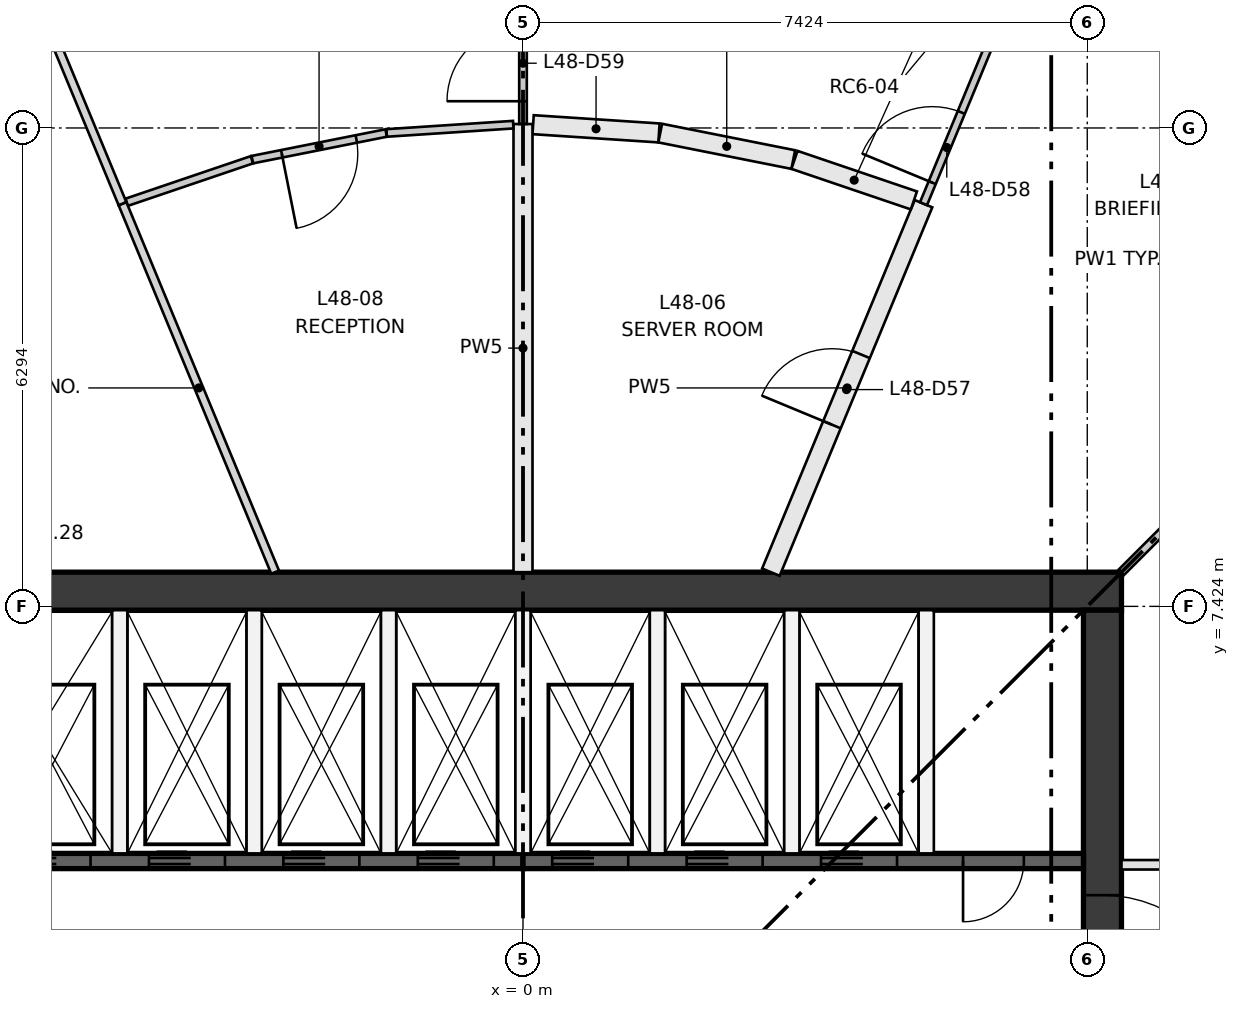
"""IFC4 building model, lengths in metres.
Left out: names, types, materials, properties, quantities, classifications, styles, units other than length and angle.
Written with IfcOpenShell. Run it as: python <this file> out.ifc"""

import sys

from ifc_helpers import new_model, si_unit, direction, frame, frame_2d, origin, place, context, subcontext, project, spatial, rectangle, extrude, element, fill, save


model = new_model("IFC4")
c1 = context("Model", 3, precision=1e-05, world=origin(), true_north=direction((0.0, 1.0)))
c2 = subcontext(c1, "Body", "Model", "MODEL_VIEW")
j1 = project(units=[si_unit("LENGTHUNIT", "METRE"), si_unit("PLANEANGLEUNIT", "RADIAN")], contexts=[c1])
p1 = place(None, origin())
s1 = spatial("IfcSite", under=j1, at=p1, CompositionType="ELEMENT")
p2 = place(p1, origin())
s2 = spatial("IfcBuilding", under=s1, at=p2, CompositionType="ELEMENT")
p3 = place(p2, frame((0.0, 0.0, 180.95)))
s3 = spatial("IfcBuildingStorey", under=s2, at=p3, CompositionType="ELEMENT", Elevation=180.95)
p4 = place(p3, frame((-7.874, 7.624, 0.0), z_axis=(0.0, 0.0, 1.0), x_axis=(1.0, 0.0, 0.0)))
e1 = element("IfcWall", 1, at=p4, inside=s3, PredefinedType="SHEAR", context=c2, shape_type="SweptSolid", body=[
    extrude(rectangle(XDim=15.748, YDim=0.5, at=frame_2d((7.874, 0.0))), origin(), (0.0, 0.0, 1.0), 3.35),
])
p5 = place(p3, frame((7.624, -7.374, 0.0), z_axis=(0.0, 0.0, 1.0), x_axis=(0.0, 1.0, 0.0)))
e2 = element("IfcWall", 2, at=p5, inside=s3, PredefinedType="SHEAR", context=c2, shape_type="SweptSolid", body=[
    extrude(rectangle(XDim=14.748, YDim=0.5, at=frame_2d((7.374, 0.0))), origin(), (0.0, 0.0, 1.0), 3.35),
])
p6 = place(p5, frame((6.874, 0.0, 0.0)))
e3 = element("IfcOpeningElement", 3, at=p6, cuts=e2, PredefinedType="OPENING", context=c2, shape_type="SweptSolid", body=[
    extrude(rectangle(XDim=1.0, YDim=2.1, at=frame_2d((0.5, 1.05))), frame((0.0, 0.26, 0.0), z_axis=(0.0, -1.0, 0.0), x_axis=(1.0, 0.0, 0.0)), (0.0, 0.0, 1.0), 0.52),
])
p7 = place(p5, frame((3.75, 0.0, 0.0)))
e4 = element("IfcOpeningElement", 4, at=p7, cuts=e2, PredefinedType="OPENING", context=c2, shape_type="SweptSolid", body=[
    extrude(rectangle(XDim=1.8, YDim=2.1, at=frame_2d((0.9, 1.05))), frame((0.0, 0.26, 0.0), z_axis=(0.0, -1.0, 0.0), x_axis=(1.0, 0.0, 0.0)), (0.0, 0.0, 1.0), 0.52),
])
p8 = place(p5, frame((9.198, 0.0, 0.0)))
e5 = element("IfcOpeningElement", 5, at=p8, cuts=e2, PredefinedType="OPENING", context=c2, shape_type="SweptSolid", body=[
    extrude(rectangle(XDim=1.8, YDim=2.1, at=frame_2d((0.9, 1.05))), frame((0.0, 0.26, 0.0), z_axis=(0.0, -1.0, 0.0), x_axis=(1.0, 0.0, 0.0)), (0.0, 0.0, 1.0), 0.52),
])
p9 = place(p3, frame((-7.374, 4.074, 0.0), z_axis=(0.0, 0.0, 1.0), x_axis=(1.0, 0.0, 0.0)))
e6 = element("IfcWall", 6, at=p9, inside=s3, PredefinedType="SHEAR", context=c2, shape_type="SweptSolid", body=[
    extrude(rectangle(XDim=7.374, YDim=0.2, at=frame_2d((3.687, 0.0))), origin(), (0.0, 0.0, 1.0), 3.0),
])
p10 = place(p9, frame((0.684, 0.0, 0.0)))
e7 = element("IfcOpeningElement", 7, at=p10, cuts=e6, PredefinedType="OPENING", context=c2, shape_type="SweptSolid", body=[
    extrude(rectangle(XDim=1.0, YDim=2.1, at=frame_2d((0.5, 1.05))), frame((0.0, 0.11, 0.0), z_axis=(0.0, -1.0, 0.0), x_axis=(1.0, 0.0, 0.0)), (0.0, 0.0, 1.0), 0.22),
])
p11 = place(p9, frame((2.453, 0.0, 0.0)))
e8 = element("IfcOpeningElement", 8, at=p11, cuts=e6, PredefinedType="OPENING", context=c2, shape_type="SweptSolid", body=[
    extrude(rectangle(XDim=1.0, YDim=2.1, at=frame_2d((0.5, 1.05))), frame((0.0, 0.11, 0.0), z_axis=(0.0, -1.0, 0.0), x_axis=(1.0, 0.0, 0.0)), (0.0, 0.0, 1.0), 0.22),
])
p12 = place(p9, frame((4.221, 0.0, 0.0)))
e9 = element("IfcOpeningElement", 9, at=p12, cuts=e6, PredefinedType="OPENING", context=c2, shape_type="SweptSolid", body=[
    extrude(rectangle(XDim=1.0, YDim=2.1, at=frame_2d((0.5, 1.05))), frame((0.0, 0.11, 0.0), z_axis=(0.0, -1.0, 0.0), x_axis=(1.0, 0.0, 0.0)), (0.0, 0.0, 1.0), 0.22),
])
p13 = place(p9, frame((5.99, 0.0, 0.0)))
e10 = element("IfcOpeningElement", 10, at=p13, cuts=e6, PredefinedType="OPENING", context=c2, shape_type="SweptSolid", body=[
    extrude(rectangle(XDim=1.0, YDim=2.1, at=frame_2d((0.5, 1.05))), frame((0.0, 0.11, 0.0), z_axis=(0.0, -1.0, 0.0), x_axis=(1.0, 0.0, 0.0)), (0.0, 0.0, 1.0), 0.22),
])
p14 = place(p3, frame((0.0, 4.074, 0.0), z_axis=(0.0, 0.0, 1.0), x_axis=(1.0, 0.0, 0.0)))
e11 = element("IfcWall", 11, at=p14, inside=s3, PredefinedType="SHEAR", context=c2, shape_type="SweptSolid", body=[
    extrude(rectangle(XDim=7.374, YDim=0.2, at=frame_2d((3.687, 0.0))), origin(), (0.0, 0.0, 1.0), 3.0),
])
p15 = place(p14, frame((0.384, 0.0, 0.0)))
e12 = element("IfcOpeningElement", 12, at=p15, cuts=e11, PredefinedType="OPENING", context=c2, shape_type="SweptSolid", body=[
    extrude(rectangle(XDim=1.0, YDim=2.1, at=frame_2d((0.5, 1.05))), frame((0.0, 0.11, 0.0), z_axis=(0.0, -1.0, 0.0), x_axis=(1.0, 0.0, 0.0)), (0.0, 0.0, 1.0), 0.22),
])
p16 = place(p14, frame((2.153, 0.0, 0.0)))
e13 = element("IfcOpeningElement", 13, at=p16, cuts=e11, PredefinedType="OPENING", context=c2, shape_type="SweptSolid", body=[
    extrude(rectangle(XDim=1.0, YDim=2.1, at=frame_2d((0.5, 1.05))), frame((0.0, 0.11, 0.0), z_axis=(0.0, -1.0, 0.0), x_axis=(1.0, 0.0, 0.0)), (0.0, 0.0, 1.0), 0.22),
])
p17 = place(p14, frame((3.921, 0.0, 0.0)))
e14 = element("IfcOpeningElement", 14, at=p17, cuts=e11, PredefinedType="OPENING", context=c2, shape_type="SweptSolid", body=[
    extrude(rectangle(XDim=1.0, YDim=2.1, at=frame_2d((0.5, 1.05))), frame((0.0, 0.11, 0.0), z_axis=(0.0, -1.0, 0.0), x_axis=(1.0, 0.0, 0.0)), (0.0, 0.0, 1.0), 0.22),
])
p18 = place(p14, frame((5.79, 0.0, 0.0)))
e15 = element("IfcOpeningElement", 15, at=p18, cuts=e11, PredefinedType="OPENING", context=c2, shape_type="SweptSolid", body=[
    extrude(rectangle(XDim=0.8, YDim=2.1, at=frame_2d((0.4, 1.05))), frame((0.0, 0.11, 0.0), z_axis=(0.0, -1.0, 0.0), x_axis=(1.0, 0.0, 0.0)), (0.0, 0.0, 1.0), 0.22),
])
for number, where, z_axis, x_axis in (
    (16, (-5.305, 4.174, 0.0), (0.0, 0.0, 1.0), (0.0, 1.0, 0.0)),
    (17, (-3.537, 4.174, 0.0), (0.0, 0.0, 1.0), (0.0, 1.0, 0.0)),
    (18, (-1.769, 4.174, 0.0), (0.0, 0.0, 1.0), (0.0, 1.0, 0.0)),
    (19, (0.0, 4.174, 0.0), (0.0, 0.0, 1.0), (0.0, 1.0, 0.0)),
    (20, (1.769, 4.174, 0.0), (0.0, 0.0, 1.0), (0.0, 1.0, 0.0)),
    (21, (3.537, 4.174, 0.0), (0.0, 0.0, 1.0), (0.0, 1.0, 0.0)),
    (22, (5.305, 4.174, 0.0), (0.0, 0.0, 1.0), (0.0, 1.0, 0.0)),
):
    element("IfcWall", number, at=place(p3, frame(where, z_axis=z_axis, x_axis=x_axis)), inside=s3, PredefinedType="PARTITIONING", context=c2, shape_type="SweptSolid", body=[
        extrude(rectangle(XDim=3.2, YDim=0.2, at=frame_2d((1.6, 0.0))), origin(), (0.0, 0.0, 1.0), 3.0),
    ])
p19 = place(p3, frame((7.874, 4.024, 0.0), z_axis=(0.0, 0.0, 1.0), x_axis=(1.0, 0.0, 0.0)))
e23 = element("IfcWall", 23, at=p19, inside=s3, PredefinedType="PARTITIONING", context=c2, shape_type="SweptSolid", body=[
    extrude(rectangle(XDim=5.921, YDim=0.125, at=frame_2d((2.96, 0.0))), origin(), (0.0, 0.0, 1.0), 3.0),
])
p20 = place(p19, frame((2.5, 0.0, 0.0)))
e24 = element("IfcOpeningElement", 24, at=p20, cuts=e23, PredefinedType="OPENING", context=c2, shape_type="SweptSolid", body=[
    extrude(rectangle(XDim=1.0, YDim=2.1, at=frame_2d((0.5, 1.05))), frame((0.0, 0.073, 0.0), z_axis=(0.0, -1.0, 0.0), x_axis=(1.0, 0.0, 0.0)), (0.0, 0.0, 1.0), 0.145),
])
p21 = place(p3, frame((7.874, 7.874, 0.0), z_axis=(0.0, 0.0, 1.0), x_axis=(0.707106781187, 0.707106781187, 0.0)))
e25 = element("IfcWall", 25, at=p21, inside=s3, PredefinedType="PARTITIONING", context=c2, shape_type="SweptSolid", body=[
    extrude(rectangle(XDim=6.404, YDim=0.1, at=frame_2d((3.202, 0.0))), origin(), (0.0, 0.0, 1.0), 3.0),
])
p22 = place(p21, frame((2.4, 0.0, 0.0)))
e26 = element("IfcOpeningElement", 26, at=p22, cuts=e25, PredefinedType="OPENING", context=c2, shape_type="SweptSolid", body=[
    extrude(rectangle(XDim=1.0, YDim=2.1, at=frame_2d((0.5, 1.05))), frame((0.0, 0.06, 0.0), z_axis=(0.0, -1.0, 0.0), x_axis=(1.0, 0.0, 0.0)), (0.0, 0.0, 1.0), 0.12),
])
p23 = place(p3, frame((3.261, 7.874, 0.0), z_axis=(0.0, 0.0, 1.0), x_axis=(0.382698345407, 0.923873355186, 0.0)))
e27 = element("IfcWall", 27, at=p23, inside=s3, PredefinedType="PARTITIONING", context=c2, shape_type="SweptSolid", body=[
    extrude(rectangle(XDim=5.247, YDim=0.25, at=frame_2d((2.624, 0.0))), origin(), (0.0, 0.0, 1.0), 3.0),
])
p24 = place(p23, frame((2.1, 0.0, 0.0)))
e28 = element("IfcOpeningElement", 28, at=p24, cuts=e27, PredefinedType="OPENING", context=c2, shape_type="SweptSolid", body=[
    extrude(rectangle(XDim=1.0, YDim=2.1, at=frame_2d((0.5, 1.05))), frame((0.0, 0.135, 0.0), z_axis=(0.0, -1.0, 0.0), x_axis=(1.0, 0.0, 0.0)), (0.0, 0.0, 1.0), 0.27),
])
p25 = place(p3, frame((5.27, 12.722, 0.0), z_axis=(0.0, 0.0, 1.0), x_axis=(0.382706376162, 0.923870028546, 0.0)))
e29 = element("IfcWall", 29, at=p25, inside=s3, PredefinedType="PARTITIONING", context=c2, shape_type="SweptSolid", body=[
    extrude(rectangle(XDim=3.77, YDim=0.1, at=frame_2d((1.885, 0.0))), origin(), (0.0, 0.0, 1.0), 3.0),
])
p26 = place(p25, frame((0.3, 0.0, 0.0)))
e30 = element("IfcOpeningElement", 30, at=p26, cuts=e29, PredefinedType="OPENING", context=c2, shape_type="SweptSolid", body=[
    extrude(rectangle(XDim=1.0, YDim=2.1, at=frame_2d((0.5, 1.05))), frame((0.0, 0.06, 0.0), z_axis=(0.0, -1.0, 0.0), x_axis=(1.0, 0.0, 0.0)), (0.0, 0.0, 1.0), 0.12),
])
p27 = place(p3, frame((0.133, 13.761, 0.0), z_axis=(0.0, 0.0, 1.0), x_axis=(0.997854270927, -0.065474071153, 0.0)))
e31 = element("IfcWall", 31, at=p27, inside=s3, PredefinedType="PARTITIONING", context=c2, shape_type="SweptSolid", body=[
    extrude(rectangle(XDim=1.659, YDim=0.25, at=frame_2d((0.83, 0.0))), origin(), (0.0, 0.0, 1.0), 3.0),
])
p28 = place(p3, frame((1.805, 13.651, 0.0), z_axis=(0.0, 0.0, 1.0), x_axis=(0.980790558622, -0.195063784741, 0.0)))
e32 = element("IfcWall", 32, at=p28, inside=s3, PredefinedType="PARTITIONING", context=c2, shape_type="SweptSolid", body=[
    extrude(rectangle(XDim=1.785, YDim=0.25, at=frame_2d((0.892, 0.0))), origin(), (0.0, 0.0, 1.0), 3.0),
])
p29 = place(p3, frame((3.572, 13.298, 0.0), z_axis=(0.0, 0.0, 1.0), x_axis=(0.946917930367, -0.321475400536, 0.0)))
e33 = element("IfcWall", 33, at=p29, inside=s3, PredefinedType="PARTITIONING", context=c2, shape_type="SweptSolid", body=[
    extrude(rectangle(XDim=1.659, YDim=0.25, at=frame_2d((0.83, 0.0))), origin(), (0.0, 0.0, 1.0), 3.0),
])
p30 = place(p3, frame((0.0, 7.874, 0.0), z_axis=(0.0, 0.0, 1.0), x_axis=(0.0, 1.0, 0.0)))
e34 = element("IfcWall", 34, at=p30, inside=s3, PredefinedType="PARTITIONING", context=c2, shape_type="SweptSolid", body=[
    extrude(rectangle(XDim=5.896, YDim=0.25, at=frame_2d((2.948, 0.0))), origin(), (0.0, 0.0, 1.0), 3.0),
])
p31 = place(p3, frame((0.0, 13.77, 0.0), z_axis=(0.0, 0.0, 1.0), x_axis=(0.0, 1.0, 0.0)))
e35 = element("IfcWall", 35, at=p31, inside=s3, PredefinedType="PARTITIONING", context=c2, shape_type="SweptSolid", body=[
    extrude(rectangle(XDim=3.77, YDim=0.1, at=frame_2d((1.885, 0.0))), origin(), (0.0, 0.0, 1.0), 3.0),
])
p32 = place(p31, frame((0.3, 0.0, 0.0)))
e36 = element("IfcOpeningElement", 36, at=p32, cuts=e35, PredefinedType="OPENING", context=c2, shape_type="SweptSolid", body=[
    extrude(rectangle(XDim=1.0, YDim=2.1, at=frame_2d((0.5, 1.05))), frame((0.0, 0.06, 0.0), z_axis=(0.0, -1.0, 0.0), x_axis=(1.0, 0.0, 0.0)), (0.0, 0.0, 1.0), 0.12),
])
p33 = place(p3, frame((-5.214, 12.74, 0.0), z_axis=(0.0, 0.0, 1.0), x_axis=(0.946900132427, 0.321527820274, 0.0)))
e37 = element("IfcWall", 37, at=p33, inside=s3, PredefinedType="PARTITIONING", context=c2, shape_type="SweptSolid", body=[
    extrude(rectangle(XDim=1.74, YDim=0.1, at=frame_2d((0.87, 0.0))), origin(), (0.0, 0.0, 1.0), 3.0),
])
p34 = place(p3, frame((-1.801, 13.652, 0.0), z_axis=(0.0, 0.0, 1.0), x_axis=(-0.980789397091, -0.195069624886, 0.0)))
e38 = element("IfcWall", 38, at=p34, inside=s3, PredefinedType="PARTITIONING", context=c2, shape_type="SweptSolid", body=[
    extrude(rectangle(XDim=1.795, YDim=0.1, at=frame_2d((0.897, 0.0))), origin(), (0.0, 0.0, 1.0), 3.0),
])
p35 = place(p34, frame((0.4, 0.0, 0.0)))
e39 = element("IfcOpeningElement", 39, at=p35, cuts=e38, PredefinedType="OPENING", context=c2, shape_type="SweptSolid", body=[
    extrude(rectangle(XDim=1.0, YDim=2.1, at=frame_2d((0.5, 1.05))), frame((0.0, 0.06, 0.0), z_axis=(0.0, -1.0, 0.0), x_axis=(1.0, 0.0, 0.0)), (0.0, 0.0, 1.0), 0.12),
])
p36 = place(p3, frame((-1.794, 13.652, 0.0), z_axis=(0.0, 0.0, 1.0), x_axis=(0.997850681937, 0.065528746043, 0.0)))
e40 = element("IfcWall", 40, at=p36, inside=s3, PredefinedType="PARTITIONING", context=c2, shape_type="SweptSolid", body=[
    extrude(rectangle(XDim=1.669, YDim=0.1, at=frame_2d((0.834, 0.0))), origin(), (0.0, 0.0, 1.0), 3.0),
])
p37 = place(p3, frame((-3.261, 7.874, 0.0), z_axis=(0.0, 0.0, 1.0), x_axis=(-0.382698345407, 0.923873355186, 0.0)))
e41 = element("IfcWall", 41, at=p37, inside=s3, PredefinedType="PARTITIONING", context=c2, shape_type="SweptSolid", body=[
    extrude(rectangle(XDim=5.247, YDim=0.11, at=frame_2d((2.624, 0.0))), origin(), (0.0, 0.0, 1.0), 3.0),
])
p38 = place(p3, frame((-5.27, 12.722, 0.0), z_axis=(0.0, 0.0, 1.0), x_axis=(-0.382706376162, 0.923870028546, 0.0)))
e42 = element("IfcWall", 42, at=p38, inside=s3, PredefinedType="PARTITIONING", context=c2, shape_type="SweptSolid", body=[
    extrude(rectangle(XDim=3.77, YDim=0.11, at=frame_2d((1.885, 0.0))), origin(), (0.0, 0.0, 1.0), 3.0),
])
p39 = place(p10, frame((1.0, 0.0, 0.0), z_axis=(0.0, 0.0, 1.0), x_axis=(-1.0, 0.0, 0.0)))
e43 = element("IfcDoor", 43, at=p39, inside=s3, OperationType="DOUBLE_DOOR_SLIDING", PredefinedType="DOOR", context=c2, shape_type="SweptSolid", body=[
    extrude(rectangle(XDim=1.0, YDim=2.1, at=frame_2d((0.5, 1.05))), frame((0.0, 0.025, 0.0), z_axis=(0.0, -1.0, 0.0), x_axis=(1.0, 0.0, 0.0)), (0.0, 0.0, 1.0), 0.05),
])
fill(e7, e43)
p40 = place(p11, frame((1.0, 0.0, 0.0), z_axis=(0.0, 0.0, 1.0), x_axis=(-1.0, 0.0, 0.0)))
e44 = element("IfcDoor", 44, at=p40, inside=s3, OperationType="DOUBLE_DOOR_SLIDING", PredefinedType="DOOR", context=c2, shape_type="SweptSolid", body=[
    extrude(rectangle(XDim=1.0, YDim=2.1, at=frame_2d((0.5, 1.05))), frame((0.0, 0.025, 0.0), z_axis=(0.0, -1.0, 0.0), x_axis=(1.0, 0.0, 0.0)), (0.0, 0.0, 1.0), 0.05),
])
fill(e8, e44)
p41 = place(p12, frame((1.0, 0.0, 0.0), z_axis=(0.0, 0.0, 1.0), x_axis=(-1.0, 0.0, 0.0)))
e45 = element("IfcDoor", 45, at=p41, inside=s3, OperationType="DOUBLE_DOOR_SLIDING", PredefinedType="DOOR", context=c2, shape_type="SweptSolid", body=[
    extrude(rectangle(XDim=1.0, YDim=2.1, at=frame_2d((0.5, 1.05))), frame((0.0, 0.025, 0.0), z_axis=(0.0, -1.0, 0.0), x_axis=(1.0, 0.0, 0.0)), (0.0, 0.0, 1.0), 0.05),
])
fill(e9, e45)
p42 = place(p13, frame((1.0, 0.0, 0.0), z_axis=(0.0, 0.0, 1.0), x_axis=(-1.0, 0.0, 0.0)))
e46 = element("IfcDoor", 46, at=p42, inside=s3, OperationType="DOUBLE_DOOR_SLIDING", PredefinedType="DOOR", context=c2, shape_type="SweptSolid", body=[
    extrude(rectangle(XDim=1.0, YDim=2.1, at=frame_2d((0.5, 1.05))), frame((0.0, 0.025, 0.0), z_axis=(0.0, -1.0, 0.0), x_axis=(1.0, 0.0, 0.0)), (0.0, 0.0, 1.0), 0.05),
])
fill(e10, e46)
p43 = place(p15, frame((1.0, 0.0, 0.0), z_axis=(0.0, 0.0, 1.0), x_axis=(-1.0, 0.0, 0.0)))
e47 = element("IfcDoor", 47, at=p43, inside=s3, OperationType="DOUBLE_DOOR_SLIDING", PredefinedType="DOOR", context=c2, shape_type="SweptSolid", body=[
    extrude(rectangle(XDim=1.0, YDim=2.1, at=frame_2d((0.5, 1.05))), frame((0.0, 0.025, 0.0), z_axis=(0.0, -1.0, 0.0), x_axis=(1.0, 0.0, 0.0)), (0.0, 0.0, 1.0), 0.05),
])
fill(e12, e47)
p44 = place(p16, frame((1.0, 0.0, 0.0), z_axis=(0.0, 0.0, 1.0), x_axis=(-1.0, 0.0, 0.0)))
e48 = element("IfcDoor", 48, at=p44, inside=s3, OperationType="DOUBLE_DOOR_SLIDING", PredefinedType="DOOR", context=c2, shape_type="SweptSolid", body=[
    extrude(rectangle(XDim=1.0, YDim=2.1, at=frame_2d((0.5, 1.05))), frame((0.0, 0.025, 0.0), z_axis=(0.0, -1.0, 0.0), x_axis=(1.0, 0.0, 0.0)), (0.0, 0.0, 1.0), 0.05),
])
fill(e13, e48)
p45 = place(p17, frame((1.0, 0.0, 0.0), z_axis=(0.0, 0.0, 1.0), x_axis=(-1.0, 0.0, 0.0)))
e49 = element("IfcDoor", 49, at=p45, inside=s3, OperationType="DOUBLE_DOOR_SLIDING", PredefinedType="DOOR", context=c2, shape_type="SweptSolid", body=[
    extrude(rectangle(XDim=1.0, YDim=2.1, at=frame_2d((0.5, 1.05))), frame((0.0, 0.025, 0.0), z_axis=(0.0, -1.0, 0.0), x_axis=(1.0, 0.0, 0.0)), (0.0, 0.0, 1.0), 0.05),
])
fill(e14, e49)
p46 = place(p18, frame((0.8, 0.0, 0.0), z_axis=(0.0, 0.0, 1.0), x_axis=(-1.0, 0.0, 0.0)))
e50 = element("IfcDoor", 50, at=p46, inside=s3, OperationType="SINGLE_SWING_LEFT", PredefinedType="DOOR", context=c2, shape_type="SweptSolid", body=[
    extrude(rectangle(XDim=0.8, YDim=2.1, at=frame_2d((0.4, 1.05))), frame((0.0, 0.025, 0.0), z_axis=(0.0, -1.0, 0.0), x_axis=(1.0, 0.0, 0.0)), (0.0, 0.0, 1.0), 0.05),
])
fill(e15, e50)
p47 = place(p8, frame((1.8, 0.0, 0.0), z_axis=(0.0, 0.0, 1.0), x_axis=(-1.0, 0.0, 0.0)))
e51 = element("IfcDoor", 51, at=p47, inside=s3, OperationType="DOUBLE_DOOR_SINGLE_SWING", PredefinedType="DOOR", context=c2, shape_type="SweptSolid", body=[
    extrude(rectangle(XDim=1.8, YDim=2.1, at=frame_2d((0.9, 1.05))), frame((0.0, 0.025, 0.0), z_axis=(0.0, -1.0, 0.0), x_axis=(1.0, 0.0, 0.0)), (0.0, 0.0, 1.0), 0.05),
])
fill(e5, e51)
p48 = place(p24, origin())
e52 = element("IfcDoor", 52, at=p48, inside=s3, OperationType="SINGLE_SWING_LEFT", PredefinedType="DOOR", context=c2, shape_type="SweptSolid", body=[
    extrude(rectangle(XDim=1.0, YDim=2.1, at=frame_2d((0.5, 1.05))), frame((0.0, 0.025, 0.0), z_axis=(0.0, -1.0, 0.0), x_axis=(1.0, 0.0, 0.0)), (0.0, 0.0, 1.0), 0.05),
])
fill(e28, e52)
p49 = place(p26, origin())
e53 = element("IfcDoor", 53, at=p49, inside=s3, OperationType="SINGLE_SWING_LEFT", PredefinedType="DOOR", context=c2, shape_type="SweptSolid", body=[
    extrude(rectangle(XDim=1.0, YDim=2.1, at=frame_2d((0.5, 1.05))), frame((0.0, 0.025, 0.0), z_axis=(0.0, -1.0, 0.0), x_axis=(1.0, 0.0, 0.0)), (0.0, 0.0, 1.0), 0.05),
])
fill(e30, e53)
p50 = place(p32, origin())
e54 = element("IfcDoor", 54, at=p50, inside=s3, OperationType="SINGLE_SWING_LEFT", PredefinedType="DOOR", context=c2, shape_type="SweptSolid", body=[
    extrude(rectangle(XDim=1.0, YDim=2.1, at=frame_2d((0.5, 1.05))), frame((0.0, 0.025, 0.0), z_axis=(0.0, -1.0, 0.0), x_axis=(1.0, 0.0, 0.0)), (0.0, 0.0, 1.0), 0.05),
])
fill(e36, e54)
p51 = place(p35, origin())
e55 = element("IfcDoor", 55, at=p51, inside=s3, OperationType="SINGLE_SWING_RIGHT", PredefinedType="DOOR", context=c2, shape_type="SweptSolid", body=[
    extrude(rectangle(XDim=1.0, YDim=2.1, at=frame_2d((0.5, 1.05))), frame((0.0, 0.025, 0.0), z_axis=(0.0, -1.0, 0.0), x_axis=(1.0, 0.0, 0.0)), (0.0, 0.0, 1.0), 0.05),
])
fill(e39, e55)
save(model, sys.argv[1])
